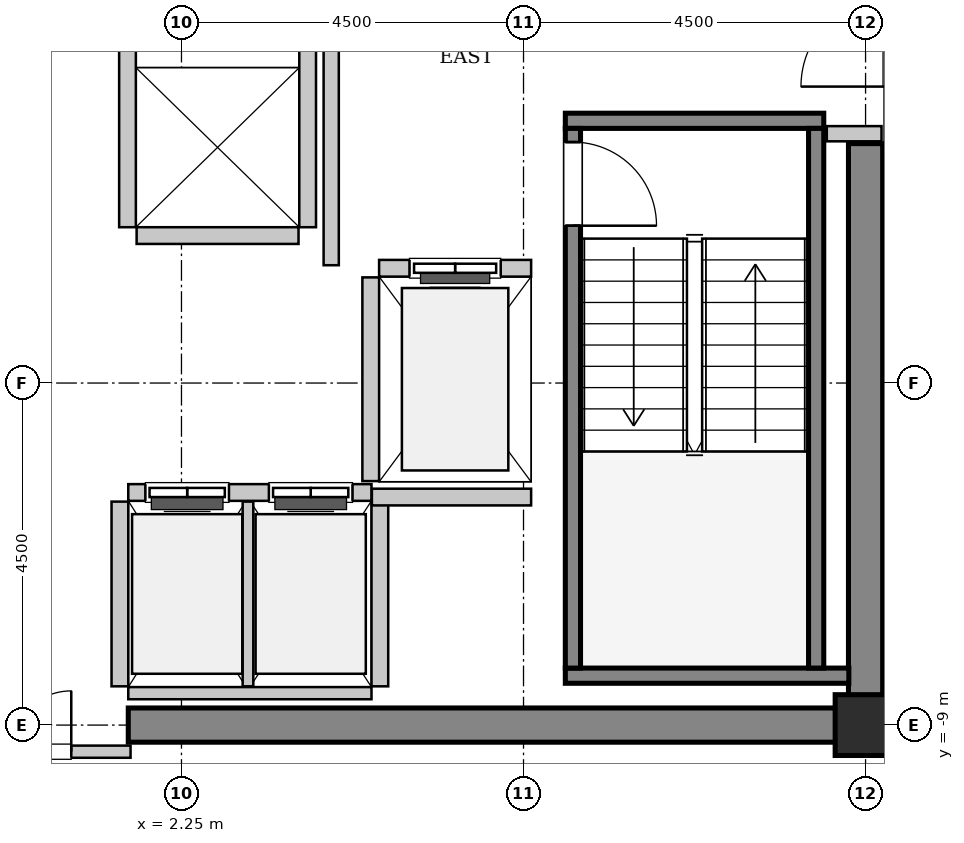
"""IFC4 building model, lengths in metres.
Left out: names, types, materials, properties, quantities, classifications, styles, units other than length and angle.
Written with IfcOpenShell. Run it as: python <this file> out.ifc"""

import sys

from ifc_helpers import new_model, si_unit, direction, frame, frame_2d, origin, origin_2d, place, context, subcontext, project, spatial, rectangle, hollow_rectangle, extrude, source, transform, mapped, element, fill, save


model = new_model("IFC4")
c1 = context("Model", 3, precision=1e-05, world=origin(), true_north=direction((0.0, 1.0)))
c2 = subcontext(c1, "Body", "Model", "MODEL_VIEW")
j1 = project(units=[si_unit("LENGTHUNIT", "METRE"), si_unit("PLANEANGLEUNIT", "RADIAN")], contexts=[c1])
p1 = place(None, origin())
s1 = spatial("IfcSite", under=j1, at=p1, CompositionType="ELEMENT")
p2 = place(p1, origin())
s2 = spatial("IfcBuilding", under=s1, at=p2, CompositionType="ELEMENT")
p3 = place(p2, frame((0.0, 0.0, 252.2)))
s3 = spatial("IfcBuildingStorey", under=s2, at=p3, CompositionType="ELEMENT", Elevation=252.2)
m1 = source(origin(), c2, "Body", "SweptSolid", [
    extrude(rectangle(XDim=9.925, YDim=0.45, at=frame_2d((4.962, 0.0))), origin(), (0.0, 0.0, 1.0), 3.8),
])
p4 = place(p3, frame((1.55, -9.0, 0.0), z_axis=(0.0, 0.0, 1.0), x_axis=(1.0, 0.0, 0.0)))
e1 = element("IfcWall", 1, at=p4, inside=s3, PredefinedType="SHEAR", context=c2, shape_type="MappedRepresentation", body=[
    mapped(m1, transform((0.0, 0.0, 0.0), x_axis=(1.0, 0.0, 0.0), y_axis=(0.0, 1.0, 0.0), z_axis=(0.0, 0.0, 1.0), scale=1.0)),
])
m2 = source(origin(), c2, "Body", "SweptSolid", [
    extrude(rectangle(XDim=7.425, YDim=0.45, at=frame_2d((3.712, 0.0))), origin(), (0.0, 0.0, 1.0), 3.8),
])
p5 = place(p3, frame((11.25, -8.775, 0.0), z_axis=(0.0, 0.0, 1.0), x_axis=(0.0, 1.0, 0.0)))
e2 = element("IfcWall", 2, at=p5, inside=s3, PredefinedType="SHEAR", context=c2, shape_type="MappedRepresentation", body=[
    mapped(m2, transform((0.0, 0.0, 0.0), x_axis=(1.0, 0.0, 0.0), y_axis=(0.0, 1.0, 0.0), z_axis=(0.0, 0.0, 1.0), scale=1.0)),
])
m3 = source(origin(), c2, "Body", "SweptSolid", [
    extrude(hollow_rectangle(XDim=0.8, YDim=0.8, WallThickness=0.04, InnerFilletRadius=0.04, OuterFilletRadius=0.08, at=origin_2d()), origin(), (0.0, 0.0, 1.0), 3.8),
])
p6 = place(p3, frame((11.25, -9.0, 0.0), z_axis=(0.0, 0.0, 1.0), x_axis=(1.0, 0.0, 0.0)))
e3 = element("IfcColumn", 3, at=p6, inside=s3, PredefinedType="COLUMN", context=c2, shape_type="MappedRepresentation", body=[
    mapped(m3, transform((0.0, 0.0, 0.0), x_axis=(1.0, 0.0, 0.0), y_axis=(0.0, 1.0, 0.0), z_axis=(0.0, 0.0, 1.0), scale=1.0)),
])
m4 = source(origin(), c2, "Body", "SweptSolid", [
    extrude(rectangle(XDim=3.4, YDim=0.2, at=frame_2d((1.7, 0.0))), origin(), (0.0, 0.0, 1.0), 3.8),
])
p7 = place(p3, frame((7.3, -1.05, 0.0), z_axis=(0.0, 0.0, 1.0), x_axis=(1.0, 0.0, 0.0)))
e4 = element("IfcWall", 4, at=p7, inside=s3, PredefinedType="SOLIDWALL", context=c2, shape_type="MappedRepresentation", body=[
    mapped(m4, transform((0.0, 0.0, 0.0), x_axis=(1.0, 0.0, 0.0), y_axis=(0.0, 1.0, 0.0), z_axis=(0.0, 0.0, 1.0), scale=1.0)),
])
m5 = source(origin(), c2, "Body", "SweptSolid", [
    extrude(rectangle(XDim=3.73, YDim=0.2, at=frame_2d((1.865, 0.0))), origin(), (0.0, 0.0, 1.0), 3.8),
])
p8 = place(p3, frame((7.3, -8.35, 0.0), z_axis=(0.0, 0.0, 1.0), x_axis=(1.0, 0.0, 0.0)))
e5 = element("IfcWall", 5, at=p8, inside=s3, PredefinedType="SOLIDWALL", context=c2, shape_type="MappedRepresentation", body=[
    mapped(m5, transform((0.0, 0.0, 0.0), x_axis=(1.0, 0.0, 0.0), y_axis=(0.0, 1.0, 0.0), z_axis=(0.0, 0.0, 1.0), scale=1.0)),
])
m6 = source(origin(), c2, "Body", "SweptSolid", [
    extrude(rectangle(XDim=7.1, YDim=0.2, at=frame_2d((3.55, 0.0))), origin(), (0.0, 0.0, 1.0), 3.8),
])
p9 = place(p3, frame((7.4, -1.15, 0.0), z_axis=(0.0, 0.0, 1.0), x_axis=(0.0, -1.0, 0.0)))
e6 = element("IfcWall", 6, at=p9, inside=s3, PredefinedType="SOLIDWALL", context=c2, shape_type="MappedRepresentation", body=[
    mapped(m6, transform((0.0, 0.0, 0.0), x_axis=(1.0, 0.0, 0.0), y_axis=(0.0, 1.0, 0.0), z_axis=(0.0, 0.0, 1.0), scale=1.0)),
])
p10 = place(p9, frame((0.18, 0.0, 0.0)))
e7 = element("IfcOpeningElement", 7, at=p10, cuts=e6, PredefinedType="OPENING", context=c2, shape_type="SweptSolid", body=[
    extrude(rectangle(XDim=1.1, YDim=2.15, at=frame_2d((0.55, 1.075))), frame((0.0, 0.11, 0.0), z_axis=(0.0, -1.0, 0.0), x_axis=(1.0, 0.0, 0.0)), (0.0, 0.0, 1.0), 0.22),
])
p11 = place(p3, frame((10.6, -1.15, 0.0), z_axis=(0.0, 0.0, 1.0), x_axis=(0.0, -1.0, 0.0)))
e8 = element("IfcWall", 8, at=p11, inside=s3, PredefinedType="SOLIDWALL", context=c2, shape_type="MappedRepresentation", body=[
    mapped(m6, transform((0.0, 0.0, 0.0), x_axis=(1.0, 0.0, 0.0), y_axis=(0.0, 1.0, 0.0), z_axis=(0.0, 0.0, 1.0), scale=1.0)),
])
m7 = source(origin(), c2, "Body", "SweptSolid", [
    extrude(rectangle(XDim=2.0, YDim=0.22, at=frame_2d((1.0, 0.0))), origin(), (0.0, 0.0, 1.0), 3.535),
])
p12 = place(p3, frame((6.85, -2.99, 0.0), z_axis=(0.0, 0.0, 1.0), x_axis=(-1.0, 0.0, 0.0)))
e9 = element("IfcWall", 9, at=p12, inside=s3, PredefinedType="SOLIDWALL", context=c2, shape_type="MappedRepresentation", body=[
    mapped(m7, transform((0.0, 0.0, 0.0), x_axis=(1.0, 0.0, 0.0), y_axis=(0.0, 1.0, 0.0), z_axis=(0.0, 0.0, 1.0), scale=1.0)),
])
p13 = place(p12, frame((0.4, 0.0, 0.0)))
e10 = element("IfcOpeningElement", 10, at=p13, cuts=e9, PredefinedType="OPENING", context=c2, shape_type="SweptSolid", body=[
    extrude(rectangle(XDim=1.2, YDim=2.2, at=frame_2d((0.6, 1.1))), frame((0.0, 0.12, 0.0), z_axis=(0.0, -1.0, 0.0), x_axis=(1.0, 0.0, 0.0)), (0.0, 0.0, 1.0), 0.24),
])
m8 = source(origin(), c2, "Body", "SweptSolid", [
    extrude(rectangle(XDim=2.68, YDim=0.22, at=frame_2d((1.34, 0.0))), origin(), (0.0, 0.0, 1.0), 3.535),
])
p14 = place(p3, frame((4.74, -3.11, 0.0), z_axis=(0.0, 0.0, 1.0), x_axis=(0.0, -1.0, 0.0)))
e11 = element("IfcWall", 11, at=p14, inside=s3, PredefinedType="SOLIDWALL", context=c2, shape_type="MappedRepresentation", body=[
    mapped(m8, transform((0.0, 0.0, 0.0), x_axis=(1.0, 0.0, 0.0), y_axis=(0.0, 1.0, 0.0), z_axis=(0.0, 0.0, 1.0), scale=1.0)),
])
m9 = source(origin(), c2, "Body", "SweptSolid", [
    extrude(rectangle(XDim=3.2, YDim=0.22, at=frame_2d((1.6, 0.0))), origin(), (0.0, 0.0, 1.0), 3.535),
])
p15 = place(p3, frame((4.75, -5.94, 0.0), z_axis=(0.0, 0.0, 1.0), x_axis=(-1.0, 0.0, 0.0)))
e12 = element("IfcWall", 12, at=p15, inside=s3, PredefinedType="SOLIDWALL", context=c2, shape_type="MappedRepresentation", body=[
    mapped(m9, transform((0.0, 0.0, 0.0), x_axis=(1.0, 0.0, 0.0), y_axis=(0.0, 1.0, 0.0), z_axis=(0.0, 0.0, 1.0), scale=1.0)),
])
p16 = place(p15, frame((1.875, 0.0, 0.0)))
e13 = element("IfcOpeningElement", 13, at=p16, cuts=e12, PredefinedType="OPENING", context=c2, shape_type="SweptSolid", body=[
    extrude(rectangle(XDim=1.1, YDim=2.2, at=frame_2d((0.55, 1.1))), frame((0.0, 0.12, 0.0), z_axis=(0.0, -1.0, 0.0), x_axis=(1.0, 0.0, 0.0)), (0.0, 0.0, 1.0), 0.24),
])
p17 = place(p15, frame((0.25, 0.0, 0.0)))
e14 = element("IfcOpeningElement", 14, at=p17, cuts=e12, PredefinedType="OPENING", context=c2, shape_type="SweptSolid", body=[
    extrude(rectangle(XDim=1.1, YDim=2.2, at=frame_2d((0.55, 1.1))), frame((0.0, 0.12, 0.0), z_axis=(0.0, -1.0, 0.0), x_axis=(1.0, 0.0, 0.0)), (0.0, 0.0, 1.0), 0.24),
])
m10 = source(origin(), c2, "Body", "SweptSolid", [
    extrude(rectangle(XDim=3.2, YDim=0.16, at=frame_2d((1.6, 0.0))), origin(), (0.0, 0.0, 1.0), 2.625),
])
p18 = place(p3, frame((1.55, -8.58, 0.0), z_axis=(0.0, 0.0, 1.0), x_axis=(1.0, 0.0, 0.0)))
e15 = element("IfcWall", 15, at=p18, inside=s3, PredefinedType="PARTITIONING", context=c2, shape_type="MappedRepresentation", body=[
    mapped(m10, transform((0.0, 0.0, 0.0), x_axis=(1.0, 0.0, 0.0), y_axis=(0.0, 1.0, 0.0), z_axis=(0.0, 0.0, 1.0), scale=1.0)),
])
m11 = source(origin(), c2, "Body", "SweptSolid", [
    extrude(rectangle(XDim=2.43, YDim=0.22, at=frame_2d((1.215, 0.0))), origin(), (0.0, 0.0, 1.0), 3.535),
])
p19 = place(p3, frame((1.44, -6.06, 0.0), z_axis=(0.0, 0.0, 1.0), x_axis=(0.0, -1.0, 0.0)))
e16 = element("IfcWall", 16, at=p19, inside=s3, PredefinedType="SOLIDWALL", context=c2, shape_type="MappedRepresentation", body=[
    mapped(m11, transform((0.0, 0.0, 0.0), x_axis=(1.0, 0.0, 0.0), y_axis=(0.0, 1.0, 0.0), z_axis=(0.0, 0.0, 1.0), scale=1.0)),
])
m12 = source(origin(), c2, "Body", "SweptSolid", [
    extrude(rectangle(XDim=2.43, YDim=0.14, at=frame_2d((1.215, 0.0))), origin(), (0.0, 0.0, 1.0), 3.535),
])
p20 = place(p3, frame((3.125, -8.49, 0.0), z_axis=(0.0, 0.0, 1.0), x_axis=(0.0, 1.0, 0.0)))
e17 = element("IfcWall", 17, at=p20, inside=s3, PredefinedType="PARTITIONING", context=c2, shape_type="MappedRepresentation", body=[
    mapped(m12, transform((0.0, 0.0, 0.0), x_axis=(1.0, 0.0, 0.0), y_axis=(0.0, 1.0, 0.0), z_axis=(0.0, 0.0, 1.0), scale=1.0)),
])
p21 = place(p3, frame((4.86, -8.49, 0.0), z_axis=(0.0, 0.0, 1.0), x_axis=(0.0, 1.0, 0.0)))
e18 = element("IfcWall", 18, at=p21, inside=s3, PredefinedType="SOLIDWALL", context=c2, shape_type="MappedRepresentation", body=[
    mapped(m11, transform((0.0, 0.0, 0.0), x_axis=(1.0, 0.0, 0.0), y_axis=(0.0, 1.0, 0.0), z_axis=(0.0, 0.0, 1.0), scale=1.0)),
])
m13 = source(origin(), c2, "Body", "SweptSolid", [
    extrude(rectangle(XDim=4.9, YDim=0.22, at=frame_2d((2.45, 0.0))), origin(), (0.0, 0.0, 1.0), 3.535),
])
for number, where, z_axis, x_axis in (
    (19, (1.54, 2.45, 0.0), (0.0, 0.0, 1.0), (0.0, -1.0, 0.0)),
    (20, (3.91, -2.45, 0.0), (0.0, 0.0, 1.0), (0.0, 1.0, 0.0)),
):
    element("IfcWall", number, at=place(p3, frame(where, z_axis=z_axis, x_axis=x_axis)), inside=s3, PredefinedType="SOLIDWALL", context=c2, shape_type="MappedRepresentation", body=[
        mapped(m13, transform((0.0, 0.0, 0.0), x_axis=(1.0, 0.0, 0.0), y_axis=(0.0, 1.0, 0.0), z_axis=(0.0, 0.0, 1.0), scale=1.0)),
    ])
m14 = source(origin(), c2, "Body", "SweptSolid", [
    extrude(rectangle(XDim=2.13, YDim=0.22, at=frame_2d((1.065, 0.0))), origin(), (0.0, 0.0, 1.0), 3.535),
])
p22 = place(p3, frame((1.66, -2.56, 0.0), z_axis=(0.0, 0.0, 1.0), x_axis=(1.0, 0.0, 0.0)))
e21 = element("IfcWall", 21, at=p22, inside=s3, PredefinedType="SOLIDWALL", context=c2, shape_type="MappedRepresentation", body=[
    mapped(m14, transform((0.0, 0.0, 0.0), x_axis=(1.0, 0.0, 0.0), y_axis=(0.0, 1.0, 0.0), z_axis=(0.0, 0.0, 1.0), scale=1.0)),
])
m15 = source(origin(), c2, "Body", "SweptSolid", [
    extrude(rectangle(XDim=2.095, YDim=0.22, at=frame_2d((1.048, 0.0))), origin(), (0.0, 0.0, 1.0), 3.535),
])
p23 = place(p3, frame((4.755, -6.0, 0.0), z_axis=(0.0, 0.0, 1.0), x_axis=(1.0, 0.0, 0.0)))
e22 = element("IfcWall", 22, at=p23, inside=s3, PredefinedType="SOLIDWALL", context=c2, shape_type="MappedRepresentation", body=[
    mapped(m15, transform((0.0, 0.0, 0.0), x_axis=(1.0, 0.0, 0.0), y_axis=(0.0, 1.0, 0.0), z_axis=(0.0, 0.0, 1.0), scale=1.0)),
])
m16 = source(origin(), c2, "Body", "SweptSolid", [
    extrude(rectangle(XDim=5.9, YDim=0.2, at=frame_2d((2.95, 0.0))), origin(), (0.0, 0.0, 1.0), 3.535),
])
p24 = place(p3, frame((4.22, -2.95, 0.0), z_axis=(0.0, 0.0, 1.0), x_axis=(0.0, 1.0, 0.0)))
e23 = element("IfcWall", 23, at=p24, inside=s3, PredefinedType="PARTITIONING", context=c2, shape_type="MappedRepresentation", body=[
    mapped(m16, transform((0.0, 0.0, 0.0), x_axis=(1.0, 0.0, 0.0), y_axis=(0.0, 1.0, 0.0), z_axis=(0.0, 0.0, 1.0), scale=1.0)),
])
m17 = source(origin(), c2, "Body", "SweptSolid", [
    extrude(rectangle(XDim=0.72, YDim=0.2, at=frame_2d((0.36, 0.0))), origin(), (0.0, 0.0, 1.0), 3.535),
])
p25 = place(p3, frame((10.74, -1.22, 0.0), z_axis=(0.0, 0.0, 1.0), x_axis=(1.0, 0.0, 0.0)))
e24 = element("IfcWall", 24, at=p25, inside=s3, PredefinedType="PARTITIONING", context=c2, shape_type="MappedRepresentation", body=[
    mapped(m17, transform((0.0, 0.0, 0.0), x_axis=(1.0, 0.0, 0.0), y_axis=(0.0, 1.0, 0.0), z_axis=(0.0, 0.0, 1.0), scale=1.0)),
])
m18 = source(origin(), c2, "Body", "SweptSolid", [
    extrude(rectangle(XDim=3.16, YDim=0.16, at=frame_2d((1.58, 0.0))), origin(), (0.0, 0.0, 1.0), 2.625),
])
p26 = place(p3, frame((-1.58, -9.35, 0.0), z_axis=(0.0, 0.0, 1.0), x_axis=(1.0, 0.0, 0.0)))
e25 = element("IfcWall", 25, at=p26, inside=s3, PredefinedType="PARTITIONING", context=c2, shape_type="MappedRepresentation", body=[
    mapped(m18, transform((0.0, 0.0, 0.0), x_axis=(1.0, 0.0, 0.0), y_axis=(0.0, 1.0, 0.0), z_axis=(0.0, 0.0, 1.0), scale=1.0)),
])
p27 = place(p26, frame((0.78, 0.0, 0.0)))
e26 = element("IfcOpeningElement", 26, at=p27, cuts=e25, PredefinedType="OPENING", context=c2, shape_type="SweptSolid", body=[
    extrude(rectangle(XDim=1.6, YDim=2.3, at=frame_2d((0.8, 1.15))), frame((0.0, 0.09, 0.0), z_axis=(0.0, -1.0, 0.0), x_axis=(1.0, 0.0, 0.0)), (0.0, 0.0, 1.0), 0.18),
])
m19 = source(origin(), c2, "Body", "SweptSolid", [
    extrude(rectangle(XDim=1.1, YDim=2.15, at=frame_2d((0.55, 1.075))), frame((0.0, 0.025, 0.0), z_axis=(0.0, -1.0, 0.0), x_axis=(1.0, 0.0, 0.0)), (0.0, 0.0, 1.0), 0.05),
])
p28 = place(p10, origin())
e27 = element("IfcDoor", 27, at=p28, inside=s3, OperationType="SINGLE_SWING_RIGHT", PredefinedType="DOOR", context=c2, shape_type="MappedRepresentation", body=[
    mapped(m19, transform((0.0, 0.0, 0.0), x_axis=(1.0, 0.0, 0.0), y_axis=(0.0, 1.0, 0.0), z_axis=(0.0, 0.0, 1.0), scale=1.0)),
])
fill(e7, e27)
m20 = source(origin(), c2, "Body", "SweptSolid", [
    extrude(rectangle(XDim=1.2, YDim=2.2, at=frame_2d((0.6, 1.1))), frame((0.0, 0.025, 0.0), z_axis=(0.0, -1.0, 0.0), x_axis=(1.0, 0.0, 0.0)), (0.0, 0.0, 1.0), 0.05),
])
p29 = place(p13, origin())
e28 = element("IfcDoor", 28, at=p29, inside=s3, OperationType="SLIDING_TO_LEFT", PredefinedType="DOOR", context=c2, shape_type="MappedRepresentation", body=[
    mapped(m20, transform((0.0, 0.0, 0.0), x_axis=(1.0, 0.0, 0.0), y_axis=(0.0, 1.0, 0.0), z_axis=(0.0, 0.0, 1.0), scale=1.0)),
])
fill(e10, e28)
m21 = source(origin(), c2, "Body", "SweptSolid", [
    extrude(rectangle(XDim=1.1, YDim=2.2, at=frame_2d((0.55, 1.1))), frame((0.0, 0.025, 0.0), z_axis=(0.0, -1.0, 0.0), x_axis=(1.0, 0.0, 0.0)), (0.0, 0.0, 1.0), 0.05),
])
p30 = place(p16, origin())
e29 = element("IfcDoor", 29, at=p30, inside=s3, OperationType="DOUBLE_DOOR_SLIDING", PredefinedType="DOOR", context=c2, shape_type="MappedRepresentation", body=[
    mapped(m21, transform((0.0, 0.0, 0.0), x_axis=(1.0, 0.0, 0.0), y_axis=(0.0, 1.0, 0.0), z_axis=(0.0, 0.0, 1.0), scale=1.0)),
])
fill(e13, e29)
p31 = place(p17, origin())
e30 = element("IfcDoor", 30, at=p31, inside=s3, OperationType="DOUBLE_DOOR_SLIDING", PredefinedType="DOOR", context=c2, shape_type="MappedRepresentation", body=[
    mapped(m21, transform((0.0, 0.0, 0.0), x_axis=(1.0, 0.0, 0.0), y_axis=(0.0, 1.0, 0.0), z_axis=(0.0, 0.0, 1.0), scale=1.0)),
])
fill(e14, e30)
m22 = source(origin(), c2, "Body", "SweptSolid", [
    extrude(rectangle(XDim=1.6, YDim=2.3, at=frame_2d((0.8, 1.15))), frame((0.0, 0.025, 0.0), z_axis=(0.0, -1.0, 0.0), x_axis=(1.0, 0.0, 0.0)), (0.0, 0.0, 1.0), 0.05),
])
p32 = place(p27, origin())
e31 = element("IfcDoor", 31, at=p32, inside=s3, OperationType="DOUBLE_DOOR_SINGLE_SWING", PredefinedType="DOOR", context=c2, shape_type="MappedRepresentation", body=[
    mapped(m22, transform((0.0, 0.0, 0.0), x_axis=(1.0, 0.0, 0.0), y_axis=(0.0, 1.0, 0.0), z_axis=(0.0, 0.0, 1.0), scale=1.0)),
])
fill(e26, e31)
save(model, sys.argv[1])
